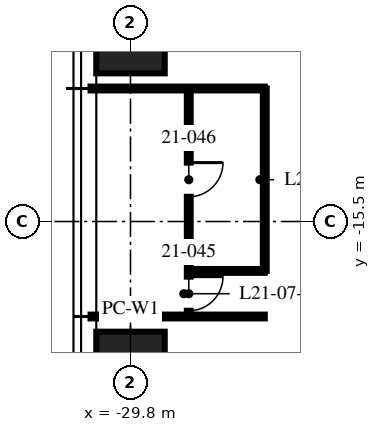
"""IFC4 building model, lengths in metres.
Left out: names, types, materials, properties, quantities, classifications, styles, units other than length and angle.
Written with IfcOpenShell. Run it as: python <this file> out.ifc"""

import sys

from ifc_helpers import new_model, si_unit, direction, frame, frame_2d, origin, origin_2d, place, context, subcontext, project, spatial, rectangle, hollow_rectangle, extrude, element, fill, save


model = new_model("IFC4")
c1 = context("Model", 3, precision=1e-05, world=origin(), true_north=direction((0.0, 1.0)))
c2 = subcontext(c1, "Body", "Model", "MODEL_VIEW")
j1 = project(units=[si_unit("LENGTHUNIT", "METRE"), si_unit("PLANEANGLEUNIT", "RADIAN")], contexts=[c1])
p1 = place(None, origin())
s1 = spatial("IfcSite", under=j1, at=p1, CompositionType="ELEMENT")
p2 = place(p1, origin())
s2 = spatial("IfcBuilding", under=s1, at=p2, CompositionType="ELEMENT")
p3 = place(p2, frame((0.0, 0.0, 84.75)))
s3 = spatial("IfcBuildingStorey", under=s2, at=p3, CompositionType="ELEMENT", Elevation=84.75)
for number, where, z_axis, x_axis in (
    (1, (-29.8, -20.0, 0.0), (0.0, 0.0, 1.0), (0.0, 1.0, 0.0)),
    (2, (-29.8, -10.0, 0.0), (0.0, 0.0, 1.0), (0.0, 1.0, 0.0)),
):
    element("IfcColumn", number, at=place(p3, frame(where, z_axis=z_axis, x_axis=x_axis)), inside=s3, PredefinedType="COLUMN", context=c2, shape_type="SweptSolid", body=[
        extrude(hollow_rectangle(XDim=3.2, YDim=1.8, WallThickness=0.2, at=origin_2d()), origin(), (0.0, 0.0, 1.0), 3.75),
    ])
for number, where, z_axis, x_axis in (
    (3, (-26.267, -12.0, 0.0), (0.0, 0.0, 1.0), (-1.0, 0.0, 0.0)),
    (4, (-26.267, -18.0, 0.0), (0.0, 0.0, 1.0), (-1.0, 0.0, 0.0)),
):
    element("IfcWall", number, at=place(p3, frame(where, z_axis=z_axis, x_axis=x_axis)), inside=s3, PredefinedType="PARTITIONING", context=c2, shape_type="SweptSolid", body=[
        extrude(rectangle(XDim=4.583, YDim=0.1, at=frame_2d((2.292, 0.0))), origin(), (0.0, 0.0, 1.0), 2.71),
    ])
p4 = place(p3, frame((-28.267, -12.0, 0.0), z_axis=(0.0, 0.0, 1.0), x_axis=(0.0, -1.0, 0.0)))
e5 = element("IfcWall", 5, at=p4, inside=s3, PredefinedType="PARTITIONING", context=c2, shape_type="SweptSolid", body=[
    extrude(rectangle(XDim=6.0, YDim=0.1, at=frame_2d((3.0, 0.0))), origin(), (0.0, 0.0, 1.0), 2.61),
])
p5 = place(p4, frame((4.95, 0.0, 0.0)))
e6 = element("IfcOpeningElement", 6, at=p5, cuts=e5, PredefinedType="OPENING", context=c2, shape_type="SweptSolid", body=[
    extrude(rectangle(XDim=0.9, YDim=2.1, at=frame_2d((0.45, 1.05))), frame((0.0, 0.06, 0.0), z_axis=(0.0, -1.0, 0.0), x_axis=(1.0, 0.0, 0.0)), (0.0, 0.0, 1.0), 0.12),
])
p6 = place(p4, frame((1.95, 0.0, 0.0)))
e7 = element("IfcOpeningElement", 7, at=p6, cuts=e5, PredefinedType="OPENING", context=c2, shape_type="SweptSolid", body=[
    extrude(rectangle(XDim=0.9, YDim=2.1, at=frame_2d((0.45, 1.05))), frame((0.0, 0.06, 0.0), z_axis=(0.0, -1.0, 0.0), x_axis=(1.0, 0.0, 0.0)), (0.0, 0.0, 1.0), 0.12),
])
p7 = place(p3, frame((-26.267, -16.8, 0.0), z_axis=(0.0, 0.0, 1.0), x_axis=(-1.0, 0.0, 0.0)))
e8 = element("IfcWall", 8, at=p7, inside=s3, PredefinedType="PARTITIONING", context=c2, shape_type="SweptSolid", body=[
    extrude(rectangle(XDim=2.0, YDim=0.1, at=frame_2d((1.0, 0.0))), origin(), (0.0, 0.0, 1.0), 3.5),
])
p8 = place(p3, frame((-26.267, -12.0, 0.0), z_axis=(0.0, 0.0, 1.0), x_axis=(0.0, -1.0, 0.0)))
e9 = element("IfcWall", 9, at=p8, inside=s3, PredefinedType="PARTITIONING", context=c2, shape_type="SweptSolid", body=[
    extrude(rectangle(XDim=4.8, YDim=0.1, at=frame_2d((2.4, 0.0))), origin(), (0.0, 0.0, 1.0), 2.61),
])
p9 = place(p5, origin())
e10 = element("IfcDoor", 10, at=p9, inside=s3, OperationType="SINGLE_SWING_LEFT", PredefinedType="DOOR", context=c2, shape_type="SweptSolid", body=[
    extrude(rectangle(XDim=0.9, YDim=2.1, at=frame_2d((0.45, 1.05))), frame((0.0, 0.025, 0.0), z_axis=(0.0, -1.0, 0.0), x_axis=(1.0, 0.0, 0.0)), (0.0, 0.0, 1.0), 0.05),
])
fill(e6, e10)
p10 = place(p6, origin())
e11 = element("IfcDoor", 11, at=p10, inside=s3, OperationType="SINGLE_SWING_LEFT", PredefinedType="DOOR", context=c2, shape_type="SweptSolid", body=[
    extrude(rectangle(XDim=0.9, YDim=2.1, at=frame_2d((0.45, 1.05))), frame((0.0, 0.025, 0.0), z_axis=(0.0, -1.0, 0.0), x_axis=(1.0, 0.0, 0.0)), (0.0, 0.0, 1.0), 0.05),
])
fill(e7, e11)
save(model, sys.argv[1])
